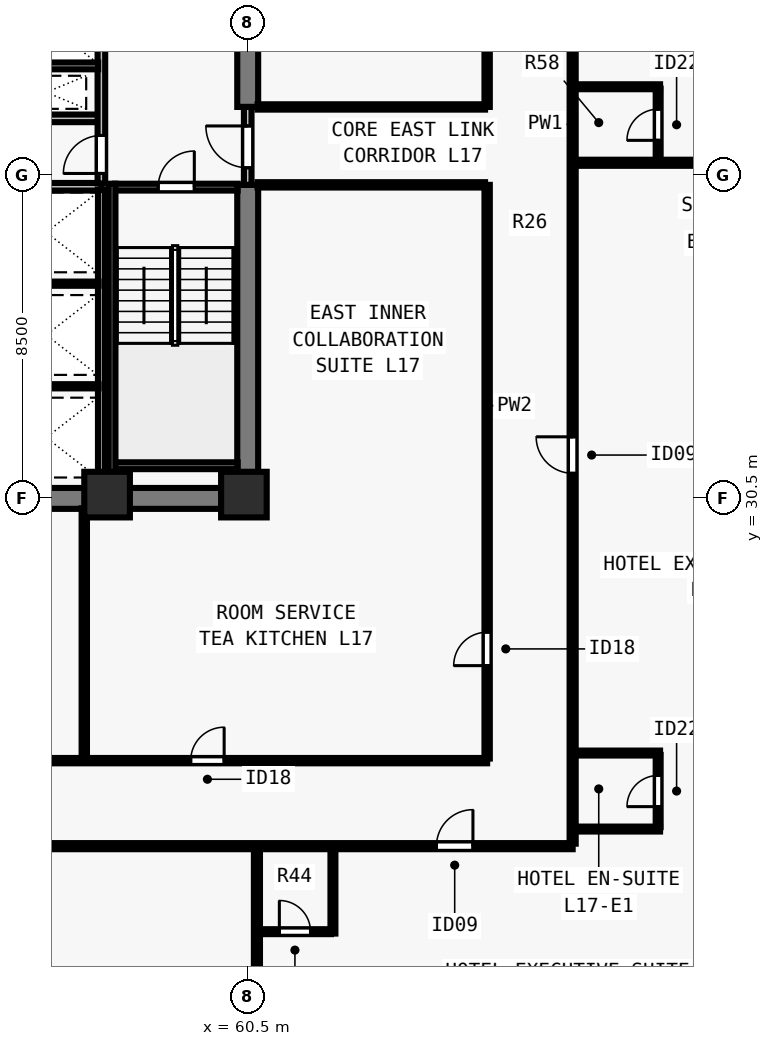
"""IFC4 building model, lengths in metres.
Left out: names, types, materials, properties, quantities, classifications, styles, units other than length and angle.
Written with IfcOpenShell. Run it as: python <this file> out.ifc"""

import sys

from ifc_helpers import new_model, si_unit, direction, frame, frame_2d, origin, origin_2d, place, context, subcontext, project, spatial, rectangle, extrude, element, fill, save


model = new_model("IFC4")
c1 = context("Model", 3, precision=1e-05, world=origin(), true_north=direction((0.0, 1.0)))
c2 = subcontext(c1, "Body", "Model", "MODEL_VIEW")
j1 = project(units=[si_unit("LENGTHUNIT", "METRE"), si_unit("PLANEANGLEUNIT", "RADIAN")], contexts=[c1])
p1 = place(None, origin())
s1 = spatial("IfcSite", under=j1, at=p1, CompositionType="ELEMENT")
p2 = place(p1, origin())
s2 = spatial("IfcBuilding", under=s1, at=p2, CompositionType="ELEMENT")
p3 = place(p2, frame((0.0, 0.0, 65.5)))
s3 = spatial("IfcBuildingStorey", under=s2, at=p3, CompositionType="ELEMENT", Elevation=65.5)
for number, where, z_axis, x_axis in (
    (1, (56.8, 30.6, 0.0), (0.0, 0.0, 1.0), (1.0, 0.0, 0.0)),
    (2, (60.4, 30.6, 0.0), (0.0, 0.0, 1.0), (1.0, 0.0, 0.0)),
):
    element("IfcColumn", number, at=place(p3, frame(where, z_axis=z_axis, x_axis=x_axis)), inside=s3, PredefinedType="COLUMN", context=c2, shape_type="SweptSolid", body=[
        extrude(rectangle(XDim=1.2, YDim=1.2, at=origin_2d()), origin(), (0.0, 0.0, 1.0), 3.5),
    ])
p4 = place(p3, frame((43.225, 30.5, 0.0), z_axis=(0.0, 0.0, 1.0), x_axis=(1.0, 0.0, 0.0)))
e3 = element("IfcWall", 3, at=p4, inside=s3, PredefinedType="SHEAR", context=c2, shape_type="SweptSolid", body=[
    extrude(rectangle(XDim=17.55, YDim=0.55, at=frame_2d((8.775, 0.0))), origin(), (0.0, 0.0, 1.0), 3.28),
])
p5 = place(p3, frame((60.5, 30.765, 0.0), z_axis=(0.0, 0.0, 1.0), x_axis=(0.0, 1.0, 0.0)))
e4 = element("IfcWall", 4, at=p5, inside=s3, PredefinedType="SHEAR", context=c2, shape_type="SweptSolid", body=[
    extrude(rectangle(XDim=7.985, YDim=0.55, at=frame_2d((3.993, 0.0))), origin(), (0.0, 0.0, 1.0), 3.28),
])
p6 = place(p3, frame((60.5, 40.8, 0.0), z_axis=(0.0, 0.0, 1.0), x_axis=(0.0, 1.0, 0.0)))
e5 = element("IfcWall", 5, at=p6, inside=s3, PredefinedType="SHEAR", context=c2, shape_type="SweptSolid", body=[
    extrude(rectangle(XDim=6.435, YDim=0.55, at=frame_2d((3.218, 0.0))), origin(), (0.0, 0.0, 1.0), 3.28),
])
for number, where, z_axis, x_axis in (
    (6, (53.7, 38.7, 0.0), (0.0, 0.0, 1.0), (1.0, 0.0, 0.0)),
    (7, (53.7, 40.5, 0.0), (0.0, 0.0, 1.0), (1.0, 0.0, 0.0)),
):
    element("IfcWall", number, at=place(p3, frame(where, z_axis=z_axis, x_axis=x_axis)), inside=s3, PredefinedType="SOLIDWALL", context=c2, shape_type="SweptSolid", body=[
        extrude(rectangle(XDim=2.95, YDim=0.2, at=frame_2d((1.475, 0.0))), origin(), (0.0, 0.0, 1.0), 3.28),
    ])
p7 = place(p3, frame((60.5, 38.75, 0.0), z_axis=(0.0, 0.0, 1.0), x_axis=(0.0, 1.0, 0.0)))
e8 = element("IfcWall", 8, at=p7, inside=s3, PredefinedType="SOLIDWALL", context=c2, shape_type="SweptSolid", body=[
    extrude(rectangle(XDim=2.05, YDim=0.2, at=frame_2d((1.025, 0.0))), origin(), (0.0, 0.0, 1.0), 3.28),
])
p8 = place(p7, frame((0.45, 0.0, 0.0)))
e9 = element("IfcOpeningElement", 9, at=p8, cuts=e8, PredefinedType="OPENING", context=c2, shape_type="SweptSolid", body=[
    extrude(rectangle(XDim=1.1, YDim=2.15, at=frame_2d((0.55, 1.075))), frame((0.0, 0.11, 0.0), z_axis=(0.0, -1.0, 0.0), x_axis=(1.0, 0.0, 0.0)), (0.0, 0.0, 1.0), 0.22),
])
p9 = place(p3, frame((56.65, 38.785, 0.0), z_axis=(0.0, 0.0, 1.0), x_axis=(0.0, 1.0, 0.0)))
e10 = element("IfcWall", 10, at=p9, inside=s3, PredefinedType="SOLIDWALL", context=c2, shape_type="SweptSolid", body=[
    extrude(rectangle(XDim=4.865, YDim=0.2, at=frame_2d((2.433, 0.0))), origin(), (0.0, 0.0, 1.0), 3.28),
])
p10 = place(p9, frame((0.265, 0.0, 0.0)))
e11 = element("IfcOpeningElement", 11, at=p10, cuts=e10, PredefinedType="OPENING", context=c2, shape_type="SweptSolid", body=[
    extrude(rectangle(XDim=1.0, YDim=2.15, at=frame_2d((0.5, 1.075))), frame((0.0, 0.11, 0.0), z_axis=(0.0, -1.0, 0.0), x_axis=(1.0, 0.0, 0.0)), (0.0, 0.0, 1.0), 0.22),
])
p11 = place(p3, frame((56.65, 30.76, 0.0), z_axis=(0.0, 0.0, 1.0), x_axis=(0.0, 1.0, 0.0)))
e12 = element("IfcWall", 12, at=p11, inside=s3, PredefinedType="SOLIDWALL", context=c2, shape_type="SweptSolid", body=[
    extrude(rectangle(XDim=7.855, YDim=0.18, at=frame_2d((3.927, 0.0))), origin(), (0.0, 0.0, 1.0), 3.28),
])
for number, where, z_axis, x_axis in (
    (13, (53.785, 33.45, 0.0), (0.0, 0.0, 1.0), (1.0, 0.0, 0.0)),
    (14, (53.785, 36.15, 0.0), (0.0, 0.0, 1.0), (1.0, 0.0, 0.0)),
):
    element("IfcWall", number, at=place(p3, frame(where, z_axis=z_axis, x_axis=x_axis)), inside=s3, PredefinedType="PARTITIONING", context=c2, shape_type="SweptSolid", body=[
        extrude(rectangle(XDim=2.79, YDim=0.11, at=frame_2d((1.395, 0.0))), origin(), (0.0, 0.0, 1.0), 3.28),
    ])
p12 = place(p3, frame((53.785, 41.88, 0.0), z_axis=(0.0, 0.0, 1.0), x_axis=(1.0, 0.0, 0.0)))
e15 = element("IfcWall", 15, at=p12, inside=s3, PredefinedType="SOLIDWALL", context=c2, shape_type="SweptSolid", body=[
    extrude(rectangle(XDim=2.78, YDim=0.18, at=frame_2d((1.39, 0.0))), origin(), (0.0, 0.0, 1.0), 3.28),
])
p13 = place(p3, frame((34.95, 21.35, 0.0), z_axis=(0.0, 0.0, 1.0), x_axis=(1.0, 0.0, 0.0)))
e16 = element("IfcWall", 16, at=p13, inside=s3, PredefinedType="PARTITIONING", context=c2, shape_type="SweptSolid", body=[
    extrude(rectangle(XDim=34.1, YDim=0.16, at=frame_2d((17.05, 0.0))), origin(), (0.0, 0.0, 1.0), 3.28),
])
p14 = place(p13, frame((3.614, 0.0, 0.0)))
e17 = element("IfcOpeningElement", 17, at=p14, cuts=e16, PredefinedType="OPENING", context=c2, shape_type="SweptSolid", body=[
    extrude(rectangle(XDim=0.96, YDim=2.15, at=frame_2d((0.48, 1.075))), frame((0.0, 0.09, 0.0), z_axis=(0.0, -1.0, 0.0), x_axis=(1.0, 0.0, 0.0)), (0.0, 0.0, 1.0), 0.18),
])
p15 = place(p13, frame((17.56, 0.0, 0.0)))
e18 = element("IfcOpeningElement", 18, at=p15, cuts=e16, PredefinedType="OPENING", context=c2, shape_type="SweptSolid", body=[
    extrude(rectangle(XDim=0.96, YDim=2.15, at=frame_2d((0.48, 1.075))), frame((0.0, 0.09, 0.0), z_axis=(0.0, -1.0, 0.0), x_axis=(1.0, 0.0, 0.0)), (0.0, 0.0, 1.0), 0.18),
])
p16 = place(p13, frame((30.516, 0.0, 0.0)))
e19 = element("IfcOpeningElement", 19, at=p16, cuts=e16, PredefinedType="OPENING", context=c2, shape_type="SweptSolid", body=[
    extrude(rectangle(XDim=0.96, YDim=2.15, at=frame_2d((0.48, 1.075))), frame((0.0, 0.09, 0.0), z_axis=(0.0, -1.0, 0.0), x_axis=(1.0, 0.0, 0.0)), (0.0, 0.0, 1.0), 0.18),
])
p17 = place(p3, frame((69.05, 21.415, 0.0), z_axis=(0.0, 0.0, 1.0), x_axis=(0.0, 1.0, 0.0)))
e20 = element("IfcWall", 20, at=p17, inside=s3, PredefinedType="PARTITIONING", context=c2, shape_type="SweptSolid", body=[
    extrude(rectangle(XDim=35.17, YDim=0.16, at=frame_2d((17.585, 0.0))), origin(), (0.0, 0.0, 1.0), 3.28),
])
p18 = place(p17, frame((9.746, 0.0, 0.0)))
e21 = element("IfcOpeningElement", 21, at=p18, cuts=e20, PredefinedType="OPENING", context=c2, shape_type="SweptSolid", body=[
    extrude(rectangle(XDim=0.96, YDim=2.15, at=frame_2d((0.48, 1.075))), frame((0.0, 0.09, 0.0), z_axis=(0.0, -1.0, 0.0), x_axis=(1.0, 0.0, 0.0)), (0.0, 0.0, 1.0), 0.18),
])
p19 = place(p17, frame((27.146, 0.0, 0.0)))
e22 = element("IfcOpeningElement", 22, at=p19, cuts=e20, PredefinedType="OPENING", context=c2, shape_type="SweptSolid", body=[
    extrude(rectangle(XDim=0.96, YDim=2.15, at=frame_2d((0.48, 1.075))), frame((0.0, 0.09, 0.0), z_axis=(0.0, -1.0, 0.0), x_axis=(1.0, 0.0, 0.0)), (0.0, 0.0, 1.0), 0.18),
])
p20 = place(p3, frame((37.2, 23.6, 0.0), z_axis=(0.0, 0.0, 1.0), x_axis=(1.0, 0.0, 0.0)))
e23 = element("IfcWall", 23, at=p20, inside=s3, PredefinedType="PARTITIONING", context=c2, shape_type="SweptSolid", body=[
    extrude(rectangle(XDim=29.6, YDim=0.14, at=frame_2d((14.8, 0.0))), origin(), (0.0, 0.0, 1.0), 3.28),
])
p21 = place(p20, frame((1.2, 0.0, 0.0)))
e24 = element("IfcOpeningElement", 24, at=p21, cuts=e23, PredefinedType="OPENING", context=c2, shape_type="SweptSolid", body=[
    extrude(rectangle(XDim=0.88, YDim=2.1, at=frame_2d((0.44, 1.05))), frame((0.0, 0.08, 0.0), z_axis=(0.0, -1.0, 0.0), x_axis=(1.0, 0.0, 0.0)), (0.0, 0.0, 1.0), 0.16),
])
p22 = place(p20, frame((11.3, 0.0, 0.0)))
e25 = element("IfcOpeningElement", 25, at=p22, cuts=e23, PredefinedType="OPENING", context=c2, shape_type="SweptSolid", body=[
    extrude(rectangle(XDim=0.88, YDim=2.1, at=frame_2d((0.44, 1.05))), frame((0.0, 0.08, 0.0), z_axis=(0.0, -1.0, 0.0), x_axis=(1.0, 0.0, 0.0)), (0.0, 0.0, 1.0), 0.16),
])
p23 = place(p20, frame((21.8, 0.0, 0.0)))
e26 = element("IfcOpeningElement", 26, at=p23, cuts=e23, PredefinedType="OPENING", context=c2, shape_type="SweptSolid", body=[
    extrude(rectangle(XDim=0.88, YDim=2.1, at=frame_2d((0.44, 1.05))), frame((0.0, 0.08, 0.0), z_axis=(0.0, -1.0, 0.0), x_axis=(1.0, 0.0, 0.0)), (0.0, 0.0, 1.0), 0.16),
])
p24 = place(p3, frame((66.8, 23.655, 0.0), z_axis=(0.0, 0.0, 1.0), x_axis=(0.0, 1.0, 0.0)))
e27 = element("IfcWall", 27, at=p24, inside=s3, PredefinedType="PARTITIONING", context=c2, shape_type="SweptSolid", body=[
    extrude(rectangle(XDim=15.095, YDim=0.14, at=frame_2d((7.547, 0.0))), origin(), (0.0, 0.0, 1.0), 3.28),
])
p25 = place(p24, frame((2.445, 0.0, 0.0)))
e28 = element("IfcOpeningElement", 28, at=p25, cuts=e27, PredefinedType="OPENING", context=c2, shape_type="SweptSolid", body=[
    extrude(rectangle(XDim=0.88, YDim=2.1, at=frame_2d((0.44, 1.05))), frame((0.0, 0.08, 0.0), z_axis=(0.0, -1.0, 0.0), x_axis=(1.0, 0.0, 0.0)), (0.0, 0.0, 1.0), 0.16),
])
p26 = place(p3, frame((66.8, 40.8, 0.0), z_axis=(0.0, 0.0, 1.0), x_axis=(0.0, 1.0, 0.0)))
e29 = element("IfcWall", 29, at=p26, inside=s3, PredefinedType="PARTITIONING", context=c2, shape_type="SweptSolid", body=[
    extrude(rectangle(XDim=13.545, YDim=0.14, at=frame_2d((6.772, 0.0))), origin(), (0.0, 0.0, 1.0), 3.28),
])
p27 = place(p26, frame((2.5, 0.0, 0.0)))
e30 = element("IfcOpeningElement", 30, at=p27, cuts=e29, PredefinedType="OPENING", context=c2, shape_type="SweptSolid", body=[
    extrude(rectangle(XDim=0.88, YDim=2.1, at=frame_2d((0.44, 1.05))), frame((0.0, 0.08, 0.0), z_axis=(0.0, -1.0, 0.0), x_axis=(1.0, 0.0, 0.0)), (0.0, 0.0, 1.0), 0.16),
])
for number, where, z_axis, x_axis in (
    (31, (60.76, 38.75, 0.0), (0.0, 0.0, 1.0), (1.0, 0.0, 0.0)),
    (32, (60.76, 40.8, 0.0), (0.0, 0.0, 1.0), (1.0, 0.0, 0.0)),
):
    element("IfcWall", number, at=place(p3, frame(where, z_axis=z_axis, x_axis=x_axis)), inside=s3, PredefinedType="PARTITIONING", context=c2, shape_type="SweptSolid", body=[
        extrude(rectangle(XDim=5.985, YDim=0.14, at=frame_2d((2.993, 0.0))), origin(), (0.0, 0.0, 1.0), 3.28),
    ])
p28 = place(p3, frame((56.2, 23.655, 0.0), z_axis=(0.0, 0.0, 1.0), x_axis=(0.0, 1.0, 0.0)))
e33 = element("IfcWall", 33, at=p28, inside=s3, PredefinedType="PARTITIONING", context=c2, shape_type="SweptSolid", body=[
    extrude(rectangle(XDim=6.585, YDim=0.14, at=frame_2d((3.292, 0.0))), origin(), (0.0, 0.0, 1.0), 2.849),
])
p29 = place(p3, frame((60.742, 13.845, 0.0), z_axis=(0.0, 0.0, 1.0), x_axis=(0.0, 1.0, 0.0)))
e34 = element("IfcWall", 34, at=p29, inside=s3, PredefinedType="PARTITIONING", context=c2, shape_type="SweptSolid", body=[
    extrude(rectangle(XDim=7.44, YDim=0.16, at=frame_2d((3.72, 0.0))), origin(), (0.0, 0.0, 1.0), 3.28),
])
p30 = place(p3, frame((62.742, 19.05, 0.0), z_axis=(0.0, 0.0, 1.0), x_axis=(0.0, 1.0, 0.0)))
e35 = element("IfcWall", 35, at=p30, inside=s3, PredefinedType="PLUMBINGWALL", context=c2, shape_type="SweptSolid", body=[
    extrude(rectangle(XDim=2.235, YDim=0.13, at=frame_2d((1.117, 0.0))), origin(), (0.0, 0.0, 1.0), 3.28),
])
p31 = place(p3, frame((60.808, 19.1, 0.0), z_axis=(0.0, 0.0, 1.0), x_axis=(1.0, 0.0, 0.0)))
e36 = element("IfcWall", 36, at=p31, inside=s3, PredefinedType="PLUMBINGWALL", context=c2, shape_type="SweptSolid", body=[
    extrude(rectangle(XDim=1.885, YDim=0.13, at=frame_2d((0.942, 0.0))), origin(), (0.0, 0.0, 1.0), 3.28),
])
p32 = place(p31, frame((0.525, 0.0, 0.0)))
e37 = element("IfcOpeningElement", 37, at=p32, cuts=e36, PredefinedType="OPENING", context=c2, shape_type="SweptSolid", body=[
    extrude(rectangle(XDim=0.82, YDim=2.1, at=frame_2d((0.41, 1.05))), frame((0.0, 0.075, 0.0), z_axis=(0.0, -1.0, 0.0), x_axis=(1.0, 0.0, 0.0)), (0.0, 0.0, 1.0), 0.15),
])
p33 = place(p3, frame((69.115, 21.8, 0.0), z_axis=(0.0, 0.0, 1.0), x_axis=(1.0, 0.0, 0.0)))
e38 = element("IfcWall", 38, at=p33, inside=s3, PredefinedType="PLUMBINGWALL", context=c2, shape_type="SweptSolid", body=[
    extrude(rectangle(XDim=2.235, YDim=0.13, at=frame_2d((1.118, 0.0))), origin(), (0.0, 0.0, 1.0), 2.849),
])
p34 = place(p3, frame((69.115, 23.8, 0.0), z_axis=(0.0, 0.0, 1.0), x_axis=(1.0, 0.0, 0.0)))
e39 = element("IfcWall", 39, at=p34, inside=s3, PredefinedType="PLUMBINGWALL", context=c2, shape_type="SweptSolid", body=[
    extrude(rectangle(XDim=2.235, YDim=0.13, at=frame_2d((1.118, 0.0))), origin(), (0.0, 0.0, 1.0), 3.28),
])
p35 = place(p3, frame((71.3, 21.85, 0.0), z_axis=(0.0, 0.0, 1.0), x_axis=(0.0, 1.0, 0.0)))
e40 = element("IfcWall", 40, at=p35, inside=s3, PredefinedType="PLUMBINGWALL", context=c2, shape_type="SweptSolid", body=[
    extrude(rectangle(XDim=1.9, YDim=0.13, at=frame_2d((0.95, 0.0))), origin(), (0.0, 0.0, 1.0), 3.28),
])
p36 = place(p35, frame((0.54, 0.0, 0.0)))
e41 = element("IfcOpeningElement", 41, at=p36, cuts=e40, PredefinedType="OPENING", context=c2, shape_type="SweptSolid", body=[
    extrude(rectangle(XDim=0.82, YDim=2.1, at=frame_2d((0.41, 1.05))), frame((0.0, 0.075, 0.0), z_axis=(0.0, -1.0, 0.0), x_axis=(1.0, 0.0, 0.0)), (0.0, 0.0, 1.0), 0.15),
])
p37 = place(p3, frame((69.115, 39.332, 0.0), z_axis=(0.0, 0.0, 1.0), x_axis=(1.0, 0.0, 0.0)))
e42 = element("IfcWall", 42, at=p37, inside=s3, PredefinedType="PARTITIONING", context=c2, shape_type="SweptSolid", body=[
    extrude(rectangle(XDim=8.115, YDim=0.16, at=frame_2d((4.058, 0.0))), origin(), (0.0, 0.0, 1.0), 3.28),
])
p38 = place(p3, frame((69.115, 41.332, 0.0), z_axis=(0.0, 0.0, 1.0), x_axis=(1.0, 0.0, 0.0)))
e43 = element("IfcWall", 43, at=p38, inside=s3, PredefinedType="PLUMBINGWALL", context=c2, shape_type="SweptSolid", body=[
    extrude(rectangle(XDim=2.235, YDim=0.13, at=frame_2d((1.118, 0.0))), origin(), (0.0, 0.0, 1.0), 3.28),
])
p39 = place(p3, frame((71.3, 39.396, 0.0), z_axis=(0.0, 0.0, 1.0), x_axis=(0.0, 1.0, 0.0)))
e44 = element("IfcWall", 44, at=p39, inside=s3, PredefinedType="PLUMBINGWALL", context=c2, shape_type="SweptSolid", body=[
    extrude(rectangle(XDim=1.885, YDim=0.13, at=frame_2d((0.942, 0.0))), origin(), (0.0, 0.0, 1.0), 3.28),
])
p40 = place(p39, frame((0.525, 0.0, 0.0)))
e45 = element("IfcOpeningElement", 45, at=p40, cuts=e44, PredefinedType="OPENING", context=c2, shape_type="SweptSolid", body=[
    extrude(rectangle(XDim=0.82, YDim=2.1, at=frame_2d((0.41, 1.05))), frame((0.0, 0.075, 0.0), z_axis=(0.0, -1.0, 0.0), x_axis=(1.0, 0.0, 0.0)), (0.0, 0.0, 1.0), 0.15),
])
p41 = place(p3, frame((57.005, 38.69, 0.0), z_axis=(0.0, 0.0, 1.0), x_axis=(1.0, 0.0, 0.0)))
e46 = element("IfcWall", 46, at=p41, inside=s3, PredefinedType="SOLIDWALL", context=c2, shape_type="SweptSolid", body=[
    extrude(rectangle(XDim=3.23, YDim=0.18, at=frame_2d((1.615, 0.0))), origin(), (0.0, 0.0, 1.0), 3.28),
])
p42 = place(p41, frame((1.14, 0.0, 0.0)))
e47 = element("IfcOpeningElement", 47, at=p42, cuts=e46, PredefinedType="OPENING", context=c2, shape_type="SweptSolid", body=[
    extrude(rectangle(XDim=0.95, YDim=2.15, at=frame_2d((0.475, 1.075))), frame((0.0, 0.1, 0.0), z_axis=(0.0, -1.0, 0.0), x_axis=(1.0, 0.0, 0.0)), (0.0, 0.0, 1.0), 0.2),
])
p43 = place(p3, frame((57.005, 31.36, 0.0), z_axis=(0.0, 0.0, 1.0), x_axis=(1.0, 0.0, 0.0)))
e48 = element("IfcWall", 48, at=p43, inside=s3, PredefinedType="SOLIDWALL", context=c2, shape_type="SweptSolid", body=[
    extrude(rectangle(XDim=3.23, YDim=0.18, at=frame_2d((1.615, 0.0))), origin(), (0.0, 0.0, 1.0), 3.28),
])
p44 = place(p3, frame((56.93, 38.78, 0.0), z_axis=(0.0, 0.0, 1.0), x_axis=(0.0, -1.0, 0.0)))
e49 = element("IfcWall", 49, at=p44, inside=s3, PredefinedType="SOLIDWALL", context=c2, shape_type="SweptSolid", body=[
    extrude(rectangle(XDim=8.017, YDim=0.18, at=frame_2d((4.009, 0.0))), origin(), (0.0, 0.0, 1.0), 3.28),
])
p45 = place(p8, origin())
e50 = element("IfcDoor", 50, at=p45, inside=s3, OperationType="SINGLE_SWING_RIGHT", PredefinedType="DOOR", context=c2, shape_type="SweptSolid", body=[
    extrude(rectangle(XDim=1.1, YDim=2.15, at=frame_2d((0.55, 1.075))), frame((0.0, 0.025, 0.0), z_axis=(0.0, -1.0, 0.0), x_axis=(1.0, 0.0, 0.0)), (0.0, 0.0, 1.0), 0.05),
])
fill(e9, e50)
p46 = place(p10, origin())
e51 = element("IfcDoor", 51, at=p46, inside=s3, OperationType="SINGLE_SWING_LEFT", PredefinedType="DOOR", context=c2, shape_type="SweptSolid", body=[
    extrude(rectangle(XDim=1.0, YDim=2.15, at=frame_2d((0.5, 1.075))), frame((0.0, 0.025, 0.0), z_axis=(0.0, -1.0, 0.0), x_axis=(1.0, 0.0, 0.0)), (0.0, 0.0, 1.0), 0.05),
])
fill(e11, e51)
p47 = place(p23, origin())
e52 = element("IfcDoor", 52, at=p47, inside=s3, OperationType="SINGLE_SWING_RIGHT", PredefinedType="DOOR", context=c2, shape_type="SweptSolid", body=[
    extrude(rectangle(XDim=0.88, YDim=2.1, at=frame_2d((0.44, 1.05))), frame((0.0, 0.025, 0.0), z_axis=(0.0, -1.0, 0.0), x_axis=(1.0, 0.0, 0.0)), (0.0, 0.0, 1.0), 0.05),
])
fill(e26, e52)
p48 = place(p25, origin())
e53 = element("IfcDoor", 53, at=p48, inside=s3, OperationType="SINGLE_SWING_LEFT", PredefinedType="DOOR", context=c2, shape_type="SweptSolid", body=[
    extrude(rectangle(XDim=0.88, YDim=2.1, at=frame_2d((0.44, 1.05))), frame((0.0, 0.025, 0.0), z_axis=(0.0, -1.0, 0.0), x_axis=(1.0, 0.0, 0.0)), (0.0, 0.0, 1.0), 0.05),
])
fill(e28, e53)
p49 = place(p32, origin())
e54 = element("IfcDoor", 54, at=p49, inside=s3, OperationType="SINGLE_SWING_LEFT", PredefinedType="DOOR", context=c2, shape_type="SweptSolid", body=[
    extrude(rectangle(XDim=0.82, YDim=2.1, at=frame_2d((0.41, 1.05))), frame((0.0, 0.025, 0.0), z_axis=(0.0, -1.0, 0.0), x_axis=(1.0, 0.0, 0.0)), (0.0, 0.0, 1.0), 0.05),
])
fill(e37, e54)
p50 = place(p16, origin())
e55 = element("IfcDoor", 55, at=p50, inside=s3, OperationType="SINGLE_SWING_RIGHT", PredefinedType="DOOR", context=c2, shape_type="SweptSolid", body=[
    extrude(rectangle(XDim=0.96, YDim=2.15, at=frame_2d((0.48, 1.075))), frame((0.0, 0.025, 0.0), z_axis=(0.0, -1.0, 0.0), x_axis=(1.0, 0.0, 0.0)), (0.0, 0.0, 1.0), 0.05),
])
fill(e19, e55)
p51 = place(p36, origin())
e56 = element("IfcDoor", 56, at=p51, inside=s3, OperationType="SINGLE_SWING_LEFT", PredefinedType="DOOR", context=c2, shape_type="SweptSolid", body=[
    extrude(rectangle(XDim=0.82, YDim=2.1, at=frame_2d((0.41, 1.05))), frame((0.0, 0.025, 0.0), z_axis=(0.0, -1.0, 0.0), x_axis=(1.0, 0.0, 0.0)), (0.0, 0.0, 1.0), 0.05),
])
fill(e41, e56)
p52 = place(p18, origin())
e57 = element("IfcDoor", 57, at=p52, inside=s3, OperationType="SINGLE_SWING_RIGHT", PredefinedType="DOOR", context=c2, shape_type="SweptSolid", body=[
    extrude(rectangle(XDim=0.96, YDim=2.15, at=frame_2d((0.48, 1.075))), frame((0.0, 0.025, 0.0), z_axis=(0.0, -1.0, 0.0), x_axis=(1.0, 0.0, 0.0)), (0.0, 0.0, 1.0), 0.05),
])
fill(e21, e57)
p53 = place(p40, origin())
e58 = element("IfcDoor", 58, at=p53, inside=s3, OperationType="SINGLE_SWING_LEFT", PredefinedType="DOOR", context=c2, shape_type="SweptSolid", body=[
    extrude(rectangle(XDim=0.82, YDim=2.1, at=frame_2d((0.41, 1.05))), frame((0.0, 0.025, 0.0), z_axis=(0.0, -1.0, 0.0), x_axis=(1.0, 0.0, 0.0)), (0.0, 0.0, 1.0), 0.05),
])
fill(e45, e58)
p54 = place(p42, origin())
e59 = element("IfcDoor", 59, at=p54, inside=s3, OperationType="SINGLE_SWING_RIGHT", PredefinedType="DOOR", context=c2, shape_type="SweptSolid", body=[
    extrude(rectangle(XDim=0.95, YDim=2.15, at=frame_2d((0.475, 1.075))), frame((0.0, 0.025, 0.0), z_axis=(0.0, -1.0, 0.0), x_axis=(1.0, 0.0, 0.0)), (0.0, 0.0, 1.0), 0.05),
])
fill(e47, e59)
save(model, sys.argv[1])
